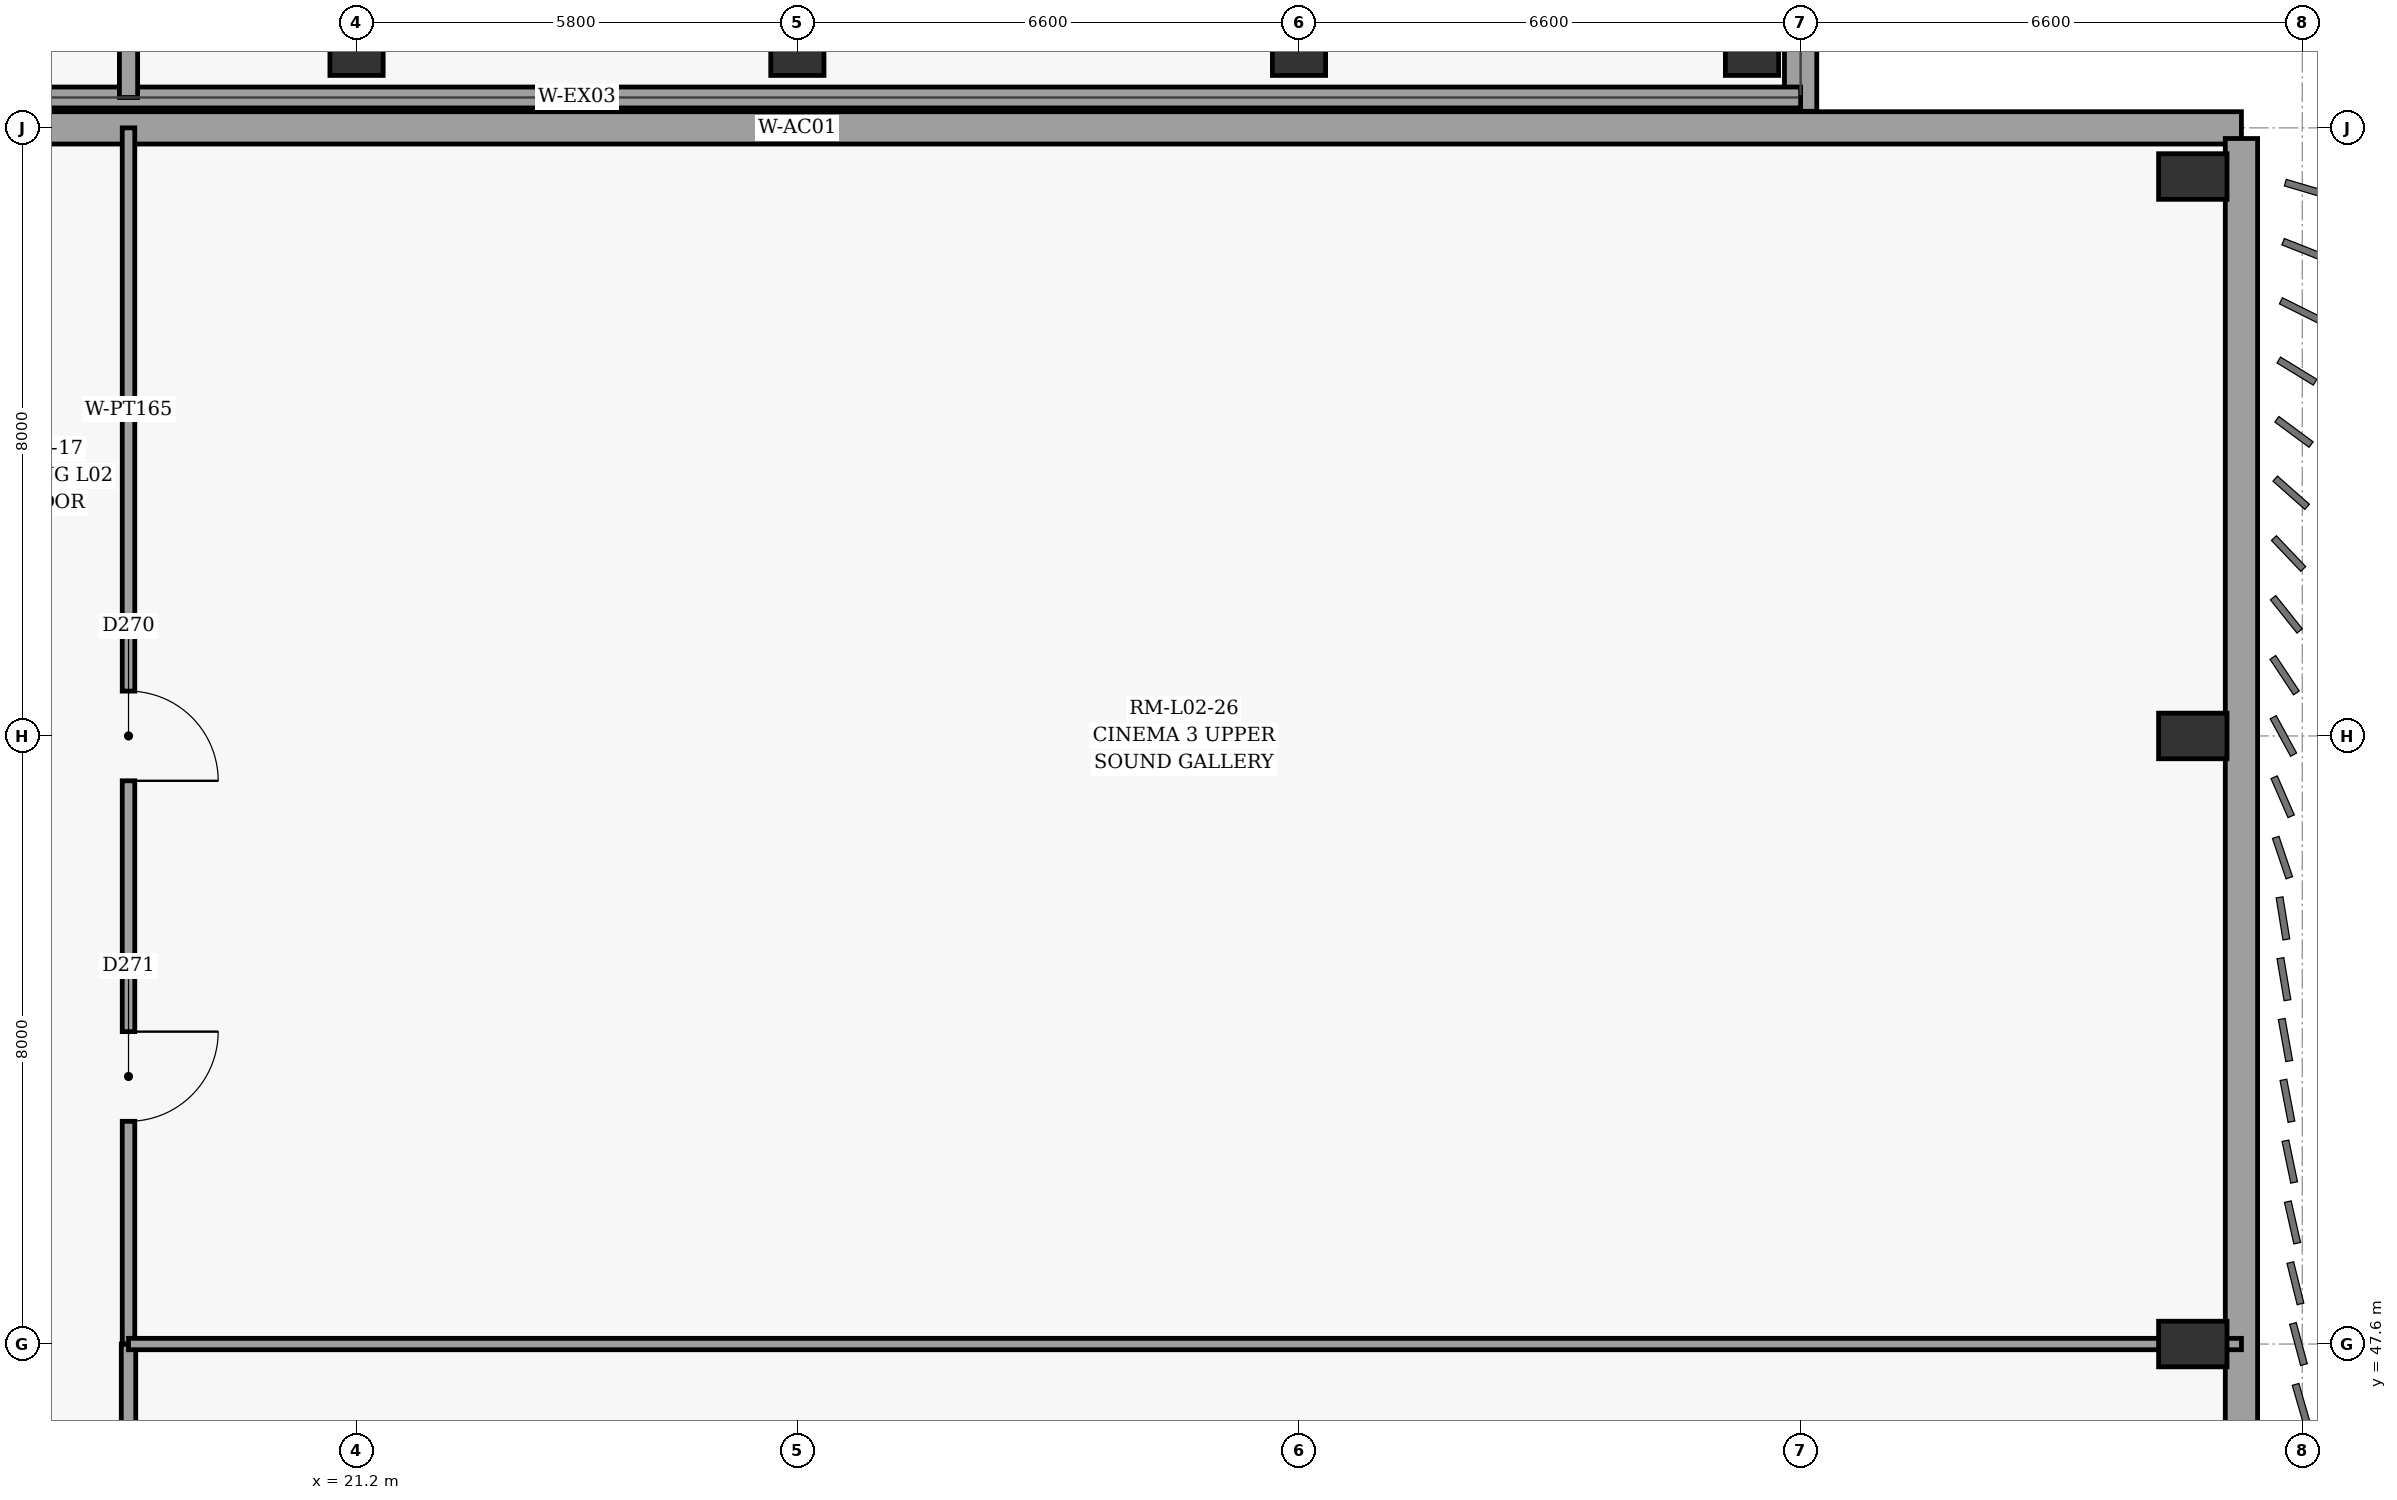
"""IFC4 building model, lengths in metres.
Left out: names, types, materials, properties, quantities, classifications, styles, units other than length and angle.
Written with IfcOpenShell. Run it as: python <this file> out.ifc"""

import sys

from ifc_helpers import new_model, si_unit, direction, frame, frame_2d, origin, origin_2d, place, context, subcontext, project, spatial, rectangle, extrude, element, fill, save


model = new_model("IFC4")
c1 = context("Model", 3, precision=1e-05, world=origin(), true_north=direction((0.0, 1.0)))
c2 = subcontext(c1, "Body", "Model", "MODEL_VIEW")
j1 = project(units=[si_unit("LENGTHUNIT", "METRE"), si_unit("PLANEANGLEUNIT", "RADIAN")], contexts=[c1])
p1 = place(None, origin())
s1 = spatial("IfcSite", under=j1, at=p1, CompositionType="ELEMENT")
p2 = place(p1, origin())
s2 = spatial("IfcBuilding", under=s1, at=p2, CompositionType="ELEMENT")
p3 = place(p2, frame((0.0, 0.0, 10.2)))
s3 = spatial("IfcBuildingStorey", under=s2, at=p3, CompositionType="ELEMENT", Elevation=10.2)
for number, where, z_axis, x_axis in (
    (1, (45.36, 47.6, 0.0), (0.0, 0.0, 1.0), (1.0, 0.0, 0.0)),
    (2, (45.36, 55.6, 0.0), (0.0, 0.0, 1.0), (1.0, 0.0, 0.0)),
    (3, (45.36, 62.96, 0.0), (0.0, 0.0, 1.0), (1.0, 0.0, 0.0)),
):
    element("IfcColumn", number, at=place(p3, frame(where, z_axis=z_axis, x_axis=x_axis)), inside=s3, PredefinedType="COLUMN", context=c2, shape_type="SweptSolid", body=[
        extrude(rectangle(XDim=0.6, YDim=0.9, at=origin_2d()), origin(), (0.0, 0.0, 1.0), 5.4),
    ])
for number, where, z_axis, x_axis in (
    (4, (21.2, 64.64, 0.0), (0.0, 0.0, 1.0), (1.0, 0.0, 0.0)),
    (5, (27.0, 64.64, 0.0), (0.0, 0.0, 1.0), (1.0, 0.0, 0.0)),
    (6, (33.6, 64.64, 0.0), (0.0, 0.0, 1.0), (1.0, 0.0, 0.0)),
    (7, (39.56, 64.64, 0.0), (0.0, 0.0, 1.0), (1.0, 0.0, 0.0)),
):
    element("IfcColumn", number, at=place(p3, frame(where, z_axis=z_axis, x_axis=x_axis)), inside=s3, PredefinedType="COLUMN", context=c2, shape_type="SweptSolid", body=[
        extrude(rectangle(XDim=0.7, YDim=0.7, at=origin_2d()), origin(), (0.0, 0.0, 1.0), 5.4),
    ])
p4 = place(p3, frame((8.0, 63.6, 0.0), z_axis=(0.0, 0.0, 1.0), x_axis=(1.0, 0.0, 0.0)))
e8 = element("IfcWall", 8, at=p4, inside=s3, PredefinedType="SOLIDWALL", context=c2, shape_type="SweptSolid", body=[
    extrude(rectangle(XDim=38.0, YDim=0.425, at=frame_2d((19.0, 0.0))), origin(), (0.0, 0.0, 1.0), 5.16),
])
p5 = place(p3, frame((46.0, 63.46, 0.0), z_axis=(0.0, 0.0, 1.0), x_axis=(0.0, -1.0, 0.0)))
e9 = element("IfcWall", 9, at=p5, inside=s3, PredefinedType="SOLIDWALL", context=c2, shape_type="SweptSolid", body=[
    extrude(rectangle(XDim=55.72, YDim=0.425, at=frame_2d((27.86, 0.0))), origin(), (0.0, 0.0, 1.0), 5.16),
])
p6 = place(p3, frame((40.2, 67.06, 0.0), z_axis=(0.0, 0.0, 1.0), x_axis=(0.0, -1.0, 0.0)))
e10 = element("IfcWall", 10, at=p6, inside=s3, PredefinedType="SOLIDWALL", context=c2, shape_type="SweptSolid", body=[
    extrude(rectangle(XDim=3.242, YDim=0.425, at=frame_2d((1.621, 0.0))), origin(), (0.0, 0.0, 1.0), 5.1),
])
p7 = place(p3, frame((40.2, 64.0, 0.0), z_axis=(0.0, 0.0, 1.0), x_axis=(-1.0, 0.0, 0.0)))
e11 = element("IfcWall", 11, at=p7, inside=s3, PredefinedType="SOLIDWALL", context=c2, shape_type="SweptSolid", body=[
    extrude(rectangle(XDim=32.2, YDim=0.275, at=frame_2d((16.1, 0.0))), origin(), (0.0, 0.0, 1.0), 3.7),
])
p8 = place(p3, frame((18.2, 47.6, 0.0), z_axis=(0.0, 0.0, 1.0), x_axis=(0.0, -1.0, 0.0)))
e12 = element("IfcWall", 12, at=p8, inside=s3, PredefinedType="PARTITIONING", context=c2, shape_type="SweptSolid", body=[
    extrude(rectangle(XDim=16.4, YDim=0.19, at=frame_2d((8.2, 0.0))), origin(), (0.0, 0.0, 1.0), 5.16),
])
p9 = place(p8, frame((7.64, 0.0, 0.0)))
e13 = element("IfcOpeningElement", 13, at=p9, cuts=e12, PredefinedType="OPENING", context=c2, shape_type="SweptSolid", body=[
    extrude(rectangle(XDim=1.12, YDim=2.15, at=frame_2d((0.56, 1.075))), frame((0.0, 0.105, 0.0), z_axis=(0.0, -1.0, 0.0), x_axis=(1.0, 0.0, 0.0)), (0.0, 0.0, 1.0), 0.21),
])
p10 = place(p8, frame((12.092, 0.0, 0.0)))
e14 = element("IfcOpeningElement", 14, at=p10, cuts=e12, PredefinedType="OPENING", context=c2, shape_type="SweptSolid", body=[
    extrude(rectangle(XDim=1.4, YDim=2.25, at=frame_2d((0.7, 1.125))), frame((0.0, 0.105, 0.0), z_axis=(0.0, -1.0, 0.0), x_axis=(1.0, 0.0, 0.0)), (0.0, 0.0, 1.0), 0.21),
])
p11 = place(p3, frame((18.2, 63.6, 0.0), z_axis=(0.0, 0.0, 1.0), x_axis=(0.0, -1.0, 0.0)))
e15 = element("IfcWall", 15, at=p11, inside=s3, PredefinedType="PARTITIONING", context=c2, shape_type="SweptSolid", body=[
    extrude(rectangle(XDim=16.0, YDim=0.165, at=frame_2d((8.0, 0.0))), origin(), (0.0, 0.0, 1.0), 5.16),
])
p12 = place(p11, frame((7.41, 0.0, 0.0)))
e16 = element("IfcOpeningElement", 16, at=p12, cuts=e15, PredefinedType="OPENING", context=c2, shape_type="SweptSolid", body=[
    extrude(rectangle(XDim=1.18, YDim=2.15, at=frame_2d((0.59, 1.075))), frame((0.0, 0.093, 0.0), z_axis=(0.0, -1.0, 0.0), x_axis=(1.0, 0.0, 0.0)), (0.0, 0.0, 1.0), 0.185),
])
p13 = place(p11, frame((11.89, 0.0, 0.0)))
e17 = element("IfcOpeningElement", 17, at=p13, cuts=e15, PredefinedType="OPENING", context=c2, shape_type="SweptSolid", body=[
    extrude(rectangle(XDim=1.18, YDim=2.15, at=frame_2d((0.59, 1.075))), frame((0.0, 0.093, 0.0), z_axis=(0.0, -1.0, 0.0), x_axis=(1.0, 0.0, 0.0)), (0.0, 0.0, 1.0), 0.185),
])
p14 = place(p3, frame((18.2, 47.6, 0.0), z_axis=(0.0, 0.0, 1.0), x_axis=(1.0, 0.0, 0.0)))
e18 = element("IfcWall", 18, at=p14, inside=s3, PredefinedType="PARTITIONING", context=c2, shape_type="SweptSolid", body=[
    extrude(rectangle(XDim=27.8, YDim=0.15, at=frame_2d((13.9, 0.0))), origin(), (0.0, 0.0, 1.0), 5.16),
])
p15 = place(p3, frame((18.2, 79.6, 0.0), z_axis=(0.0, 0.0, 1.0), x_axis=(0.0, -1.0, 0.0)))
e19 = element("IfcWall", 19, at=p15, inside=s3, PredefinedType="PARTITIONING", context=c2, shape_type="SweptSolid", body=[
    extrude(rectangle(XDim=15.6, YDim=0.24, at=frame_2d((7.8, 0.0))), origin(), (0.0, 0.0, 1.0), 5.1),
])
p16 = place(p15, frame((7.15, 0.0, 0.0)))
e20 = element("IfcOpeningElement", 20, at=p16, cuts=e19, PredefinedType="OPENING", context=c2, shape_type="SweptSolid", body=[
    extrude(rectangle(XDim=1.3, YDim=2.2, at=frame_2d((0.65, 1.1))), frame((0.0, 0.13, 0.0), z_axis=(0.0, -1.0, 0.0), x_axis=(1.0, 0.0, 0.0)), (0.0, 0.0, 1.0), 0.26),
])
p17 = place(p15, frame((11.468, 0.0, 0.0)))
e21 = element("IfcOpeningElement", 21, at=p17, cuts=e19, PredefinedType="OPENING", context=c2, shape_type="SweptSolid", body=[
    extrude(rectangle(XDim=1.4, YDim=2.25, at=frame_2d((0.7, 1.125))), frame((0.0, 0.13, 0.0), z_axis=(0.0, -1.0, 0.0), x_axis=(1.0, 0.0, 0.0)), (0.0, 0.0, 1.0), 0.26),
])
p18 = place(p12, origin())
e22 = element("IfcDoor", 22, at=p18, inside=s3, OperationType="SINGLE_SWING_RIGHT", PredefinedType="DOOR", context=c2, shape_type="SweptSolid", body=[
    extrude(rectangle(XDim=1.18, YDim=2.15, at=frame_2d((0.59, 1.075))), frame((0.0, 0.025, 0.0), z_axis=(0.0, -1.0, 0.0), x_axis=(1.0, 0.0, 0.0)), (0.0, 0.0, 1.0), 0.05),
])
fill(e16, e22)
p19 = place(p13, origin())
e23 = element("IfcDoor", 23, at=p19, inside=s3, OperationType="SINGLE_SWING_LEFT", PredefinedType="DOOR", context=c2, shape_type="SweptSolid", body=[
    extrude(rectangle(XDim=1.18, YDim=2.15, at=frame_2d((0.59, 1.075))), frame((0.0, 0.025, 0.0), z_axis=(0.0, -1.0, 0.0), x_axis=(1.0, 0.0, 0.0)), (0.0, 0.0, 1.0), 0.05),
])
fill(e17, e23)
save(model, sys.argv[1])
